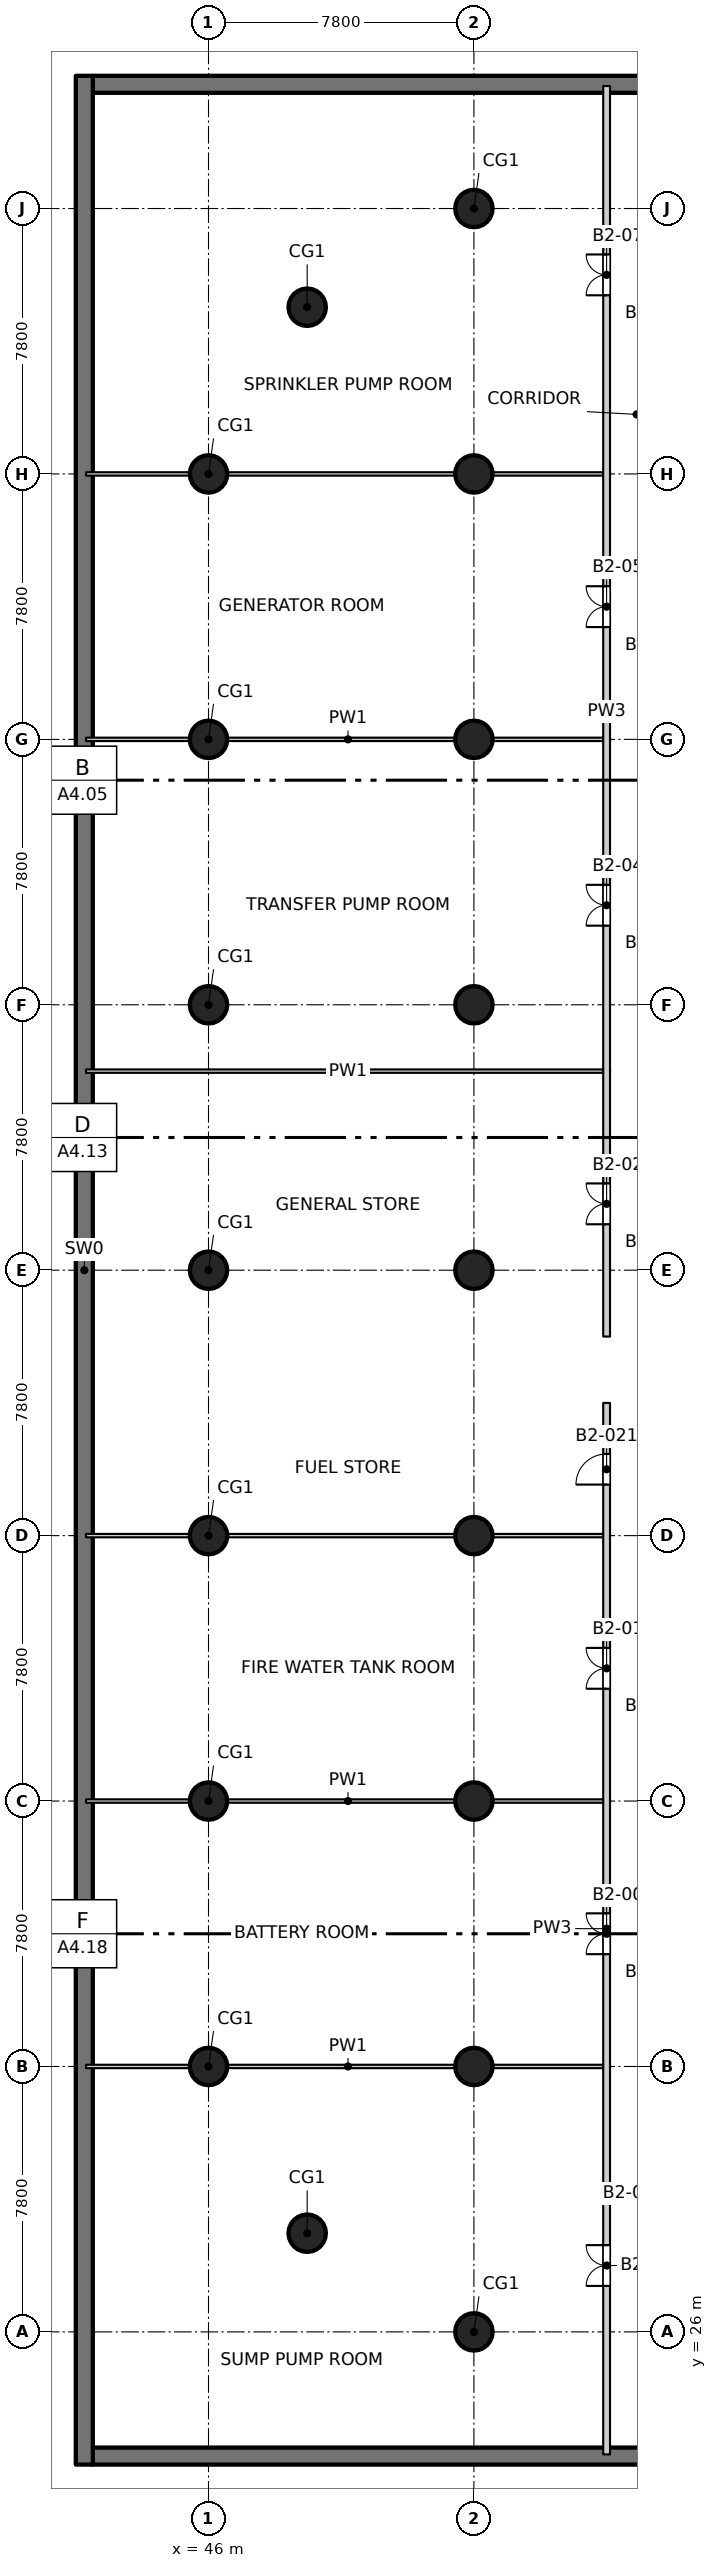
"""IFC4 building model, lengths in metres.
Left out: names, types, materials, properties, quantities, classifications, styles, units other than length and angle.
Written with IfcOpenShell. Run it as: python <this file> out.ifc"""

import sys

from ifc_helpers import new_model, si_unit, direction, frame, frame_2d, origin, origin_2d, place, context, subcontext, project, spatial, rectangle, circle, extrude, element, fill, save


model = new_model("IFC4")
c1 = context("Model", 3, precision=1e-05, world=origin(), true_north=direction((0.0, 1.0)))
c2 = subcontext(c1, "Body", "Model", "MODEL_VIEW")
j1 = project(units=[si_unit("LENGTHUNIT", "METRE"), si_unit("PLANEANGLEUNIT", "RADIAN")], contexts=[c1])
p1 = place(None, origin())
s1 = spatial("IfcSite", under=j1, at=p1, CompositionType="ELEMENT")
p2 = place(p1, origin())
s2 = spatial("IfcBuilding", under=s1, at=p2, CompositionType="ELEMENT")
p3 = place(p2, frame((0.0, 0.0, -9.0)))
s3 = spatial("IfcBuildingStorey", under=s2, at=p3, CompositionType="ELEMENT", Elevation=-9.0)
for number, where, z_axis, x_axis in (
    (1, (42.6, 22.35, -0.5), (0.0, 0.0, 1.0), (1.0, 0.0, 0.0)),
    (2, (42.6, 92.05, -0.5), (0.0, 0.0, 1.0), (1.0, 0.0, 0.0)),
):
    element("IfcWall", number, at=place(p3, frame(where, z_axis=z_axis, x_axis=x_axis)), inside=s3, PredefinedType="SOLIDWALL", context=c2, shape_type="SweptSolid", body=[
        extrude(rectangle(XDim=84.8, YDim=0.5, at=frame_2d((42.4, 0.0))), origin(), (0.0, 0.0, 1.0), 4.65),
    ])
p4 = place(p3, frame((42.35, 22.1, -0.5), z_axis=(0.0, 0.0, 1.0), x_axis=(0.0, 1.0, 0.0)))
e3 = element("IfcWall", 3, at=p4, inside=s3, PredefinedType="SOLIDWALL", context=c2, shape_type="SweptSolid", body=[
    extrude(rectangle(XDim=70.2, YDim=0.5, at=frame_2d((35.1, 0.0))), origin(), (0.0, 0.0, 1.0), 4.65),
])
for number, where, z_axis, x_axis in (
    (4, (48.9, 28.9, -0.5), (0.0, 0.0, 1.0), (1.0, 0.0, 0.0)),
    (5, (46.0, 33.8, -0.5), (0.0, 0.0, 1.0), (1.0, 0.0, 0.0)),
    (6, (46.0, 41.6, -0.5), (0.0, 0.0, 1.0), (1.0, 0.0, 0.0)),
    (7, (46.0, 49.4, -0.5), (0.0, 0.0, 1.0), (1.0, 0.0, 0.0)),
    (8, (46.0, 57.2, -0.5), (0.0, 0.0, 1.0), (1.0, 0.0, 0.0)),
    (9, (46.0, 65.0, -0.5), (0.0, 0.0, 1.0), (1.0, 0.0, 0.0)),
    (10, (46.0, 72.8, -0.5), (0.0, 0.0, 1.0), (1.0, 0.0, 0.0)),
    (11, (46.0, 80.6, -0.5), (0.0, 0.0, 1.0), (1.0, 0.0, 0.0)),
    (12, (48.9, 85.5, -0.5), (0.0, 0.0, 1.0), (1.0, 0.0, 0.0)),
    (13, (53.8, 26.0, -0.5), (0.0, 0.0, 1.0), (1.0, 0.0, 0.0)),
    (14, (53.8, 33.8, -0.5), (0.0, 0.0, 1.0), (1.0, 0.0, 0.0)),
    (15, (53.8, 41.6, -0.5), (0.0, 0.0, 1.0), (1.0, 0.0, 0.0)),
    (16, (53.8, 49.4, -0.5), (0.0, 0.0, 1.0), (1.0, 0.0, 0.0)),
    (17, (53.8, 57.2, -0.5), (0.0, 0.0, 1.0), (1.0, 0.0, 0.0)),
    (18, (53.8, 65.0, -0.5), (0.0, 0.0, 1.0), (1.0, 0.0, 0.0)),
    (19, (53.8, 72.8, -0.5), (0.0, 0.0, 1.0), (1.0, 0.0, 0.0)),
    (20, (53.8, 80.6, -0.5), (0.0, 0.0, 1.0), (1.0, 0.0, 0.0)),
    (21, (53.8, 88.4, -0.5), (0.0, 0.0, 1.0), (1.0, 0.0, 0.0)),
):
    element("IfcColumn", number, at=place(p3, frame(where, z_axis=z_axis, x_axis=x_axis)), inside=s3, PredefinedType="COLUMN", context=c2, shape_type="SweptSolid", body=[
        extrude(circle(Radius=0.55, at=origin_2d()), origin(), (0.0, 0.0, 1.0), 4.65),
    ])
for number, where, z_axis, x_axis in (
    (22, (42.4, 33.8, 0.0), (0.0, 0.0, 1.0), (1.0, 0.0, 0.0)),
    (23, (42.4, 41.6, 0.0), (0.0, 0.0, 1.0), (1.0, 0.0, 0.0)),
    (24, (42.4, 49.4, 0.0), (0.0, 0.0, 1.0), (1.0, 0.0, 0.0)),
    (25, (42.4, 63.05, 0.0), (0.0, 0.0, 1.0), (1.0, 0.0, 0.0)),
    (26, (42.4, 72.8, 0.0), (0.0, 0.0, 1.0), (1.0, 0.0, 0.0)),
    (27, (42.4, 80.6, 0.0), (0.0, 0.0, 1.0), (1.0, 0.0, 0.0)),
):
    element("IfcWall", number, at=place(p3, frame(where, z_axis=z_axis, x_axis=x_axis)), inside=s3, PredefinedType="PARTITIONING", context=c2, shape_type="SweptSolid", body=[
        extrude(rectangle(XDim=15.4, YDim=0.1, at=frame_2d((7.7, 0.0))), origin(), (0.0, 0.0, 1.0), 4.15),
    ])
p5 = place(p3, frame((57.7, 22.4, 0.0), z_axis=(0.0, 0.0, 1.0), x_axis=(0.0, 1.0, 0.0)))
e28 = element("IfcWall", 28, at=p5, inside=s3, PredefinedType="PARTITIONING", context=c2, shape_type="SweptSolid", body=[
    extrude(rectangle(XDim=30.9, YDim=0.2, at=frame_2d((15.45, 0.0))), origin(), (0.0, 0.0, 1.0), 4.15),
])
p6 = place(p5, frame((4.95, 0.0, 0.0)))
e29 = element("IfcOpeningElement", 29, at=p6, cuts=e28, PredefinedType="OPENING", context=c2, shape_type="SweptSolid", body=[
    extrude(rectangle(XDim=1.2, YDim=2.1, at=frame_2d((0.6, 1.05))), frame((0.0, 0.11, 0.0), z_axis=(0.0, -1.0, 0.0), x_axis=(1.0, 0.0, 0.0)), (0.0, 0.0, 1.0), 0.22),
])
p7 = place(p5, frame((14.7, 0.0, 0.0)))
e30 = element("IfcOpeningElement", 30, at=p7, cuts=e28, PredefinedType="OPENING", context=c2, shape_type="SweptSolid", body=[
    extrude(rectangle(XDim=1.2, YDim=2.1, at=frame_2d((0.6, 1.05))), frame((0.0, 0.11, 0.0), z_axis=(0.0, -1.0, 0.0), x_axis=(1.0, 0.0, 0.0)), (0.0, 0.0, 1.0), 0.22),
])
p8 = place(p5, frame((22.5, 0.0, 0.0)))
e31 = element("IfcOpeningElement", 31, at=p8, cuts=e28, PredefinedType="OPENING", context=c2, shape_type="SweptSolid", body=[
    extrude(rectangle(XDim=1.2, YDim=2.1, at=frame_2d((0.6, 1.05))), frame((0.0, 0.11, 0.0), z_axis=(0.0, -1.0, 0.0), x_axis=(1.0, 0.0, 0.0)), (0.0, 0.0, 1.0), 0.22),
])
p9 = place(p5, frame((28.5, 0.0, 0.0)))
e32 = element("IfcOpeningElement", 32, at=p9, cuts=e28, PredefinedType="OPENING", context=c2, shape_type="SweptSolid", body=[
    extrude(rectangle(XDim=0.9, YDim=2.1, at=frame_2d((0.45, 1.05))), frame((0.0, 0.11, 0.0), z_axis=(0.0, -1.0, 0.0), x_axis=(1.0, 0.0, 0.0)), (0.0, 0.0, 1.0), 0.22),
])
p10 = place(p3, frame((57.7, 55.25, 0.0), z_axis=(0.0, 0.0, 1.0), x_axis=(0.0, 1.0, 0.0)))
e33 = element("IfcWall", 33, at=p10, inside=s3, PredefinedType="PARTITIONING", context=c2, shape_type="SweptSolid", body=[
    extrude(rectangle(XDim=36.75, YDim=0.2, at=frame_2d((18.375, 0.0))), origin(), (0.0, 0.0, 1.0), 4.15),
])
p11 = place(p10, frame((3.3, 0.0, 0.0)))
e34 = element("IfcOpeningElement", 34, at=p11, cuts=e33, PredefinedType="OPENING", context=c2, shape_type="SweptSolid", body=[
    extrude(rectangle(XDim=1.2, YDim=2.1, at=frame_2d((0.6, 1.05))), frame((0.0, 0.11, 0.0), z_axis=(0.0, -1.0, 0.0), x_axis=(1.0, 0.0, 0.0)), (0.0, 0.0, 1.0), 0.22),
])
p12 = place(p10, frame((12.075, 0.0, 0.0)))
e35 = element("IfcOpeningElement", 35, at=p12, cuts=e33, PredefinedType="OPENING", context=c2, shape_type="SweptSolid", body=[
    extrude(rectangle(XDim=1.2, YDim=2.1, at=frame_2d((0.6, 1.05))), frame((0.0, 0.11, 0.0), z_axis=(0.0, -1.0, 0.0), x_axis=(1.0, 0.0, 0.0)), (0.0, 0.0, 1.0), 0.22),
])
p13 = place(p10, frame((20.85, 0.0, 0.0)))
e36 = element("IfcOpeningElement", 36, at=p13, cuts=e33, PredefinedType="OPENING", context=c2, shape_type="SweptSolid", body=[
    extrude(rectangle(XDim=1.2, YDim=2.1, at=frame_2d((0.6, 1.05))), frame((0.0, 0.11, 0.0), z_axis=(0.0, -1.0, 0.0), x_axis=(1.0, 0.0, 0.0)), (0.0, 0.0, 1.0), 0.22),
])
p14 = place(p10, frame((30.6, 0.0, 0.0)))
e37 = element("IfcOpeningElement", 37, at=p14, cuts=e33, PredefinedType="OPENING", context=c2, shape_type="SweptSolid", body=[
    extrude(rectangle(XDim=1.2, YDim=2.1, at=frame_2d((0.6, 1.05))), frame((0.0, 0.11, 0.0), z_axis=(0.0, -1.0, 0.0), x_axis=(1.0, 0.0, 0.0)), (0.0, 0.0, 1.0), 0.22),
])
p15 = place(p6, origin())
e38 = element("IfcDoor", 38, at=p15, inside=s3, OperationType="DOUBLE_DOOR_SINGLE_SWING", PredefinedType="DOOR", context=c2, shape_type="SweptSolid", body=[
    extrude(rectangle(XDim=1.2, YDim=2.1, at=frame_2d((0.6, 1.05))), frame((0.0, 0.025, 0.0), z_axis=(0.0, -1.0, 0.0), x_axis=(1.0, 0.0, 0.0)), (0.0, 0.0, 1.0), 0.05),
])
fill(e29, e38)
p16 = place(p7, origin())
e39 = element("IfcDoor", 39, at=p16, inside=s3, OperationType="DOUBLE_DOOR_SINGLE_SWING", PredefinedType="DOOR", context=c2, shape_type="SweptSolid", body=[
    extrude(rectangle(XDim=1.2, YDim=2.1, at=frame_2d((0.6, 1.05))), frame((0.0, 0.025, 0.0), z_axis=(0.0, -1.0, 0.0), x_axis=(1.0, 0.0, 0.0)), (0.0, 0.0, 1.0), 0.05),
])
fill(e30, e39)
p17 = place(p8, origin())
e40 = element("IfcDoor", 40, at=p17, inside=s3, OperationType="DOUBLE_DOOR_SINGLE_SWING", PredefinedType="DOOR", context=c2, shape_type="SweptSolid", body=[
    extrude(rectangle(XDim=1.2, YDim=2.1, at=frame_2d((0.6, 1.05))), frame((0.0, 0.025, 0.0), z_axis=(0.0, -1.0, 0.0), x_axis=(1.0, 0.0, 0.0)), (0.0, 0.0, 1.0), 0.05),
])
fill(e31, e40)
p18 = place(p9, origin())
e41 = element("IfcDoor", 41, at=p18, inside=s3, OperationType="SINGLE_SWING_LEFT", PredefinedType="DOOR", context=c2, shape_type="SweptSolid", body=[
    extrude(rectangle(XDim=0.9, YDim=2.1, at=frame_2d((0.45, 1.05))), frame((0.0, 0.025, 0.0), z_axis=(0.0, -1.0, 0.0), x_axis=(1.0, 0.0, 0.0)), (0.0, 0.0, 1.0), 0.05),
])
fill(e32, e41)
p19 = place(p11, origin())
e42 = element("IfcDoor", 42, at=p19, inside=s3, OperationType="DOUBLE_DOOR_SINGLE_SWING", PredefinedType="DOOR", context=c2, shape_type="SweptSolid", body=[
    extrude(rectangle(XDim=1.2, YDim=2.1, at=frame_2d((0.6, 1.05))), frame((0.0, 0.025, 0.0), z_axis=(0.0, -1.0, 0.0), x_axis=(1.0, 0.0, 0.0)), (0.0, 0.0, 1.0), 0.05),
])
fill(e34, e42)
p20 = place(p12, origin())
e43 = element("IfcDoor", 43, at=p20, inside=s3, OperationType="DOUBLE_DOOR_SINGLE_SWING", PredefinedType="DOOR", context=c2, shape_type="SweptSolid", body=[
    extrude(rectangle(XDim=1.2, YDim=2.1, at=frame_2d((0.6, 1.05))), frame((0.0, 0.025, 0.0), z_axis=(0.0, -1.0, 0.0), x_axis=(1.0, 0.0, 0.0)), (0.0, 0.0, 1.0), 0.05),
])
fill(e35, e43)
p21 = place(p13, origin())
e44 = element("IfcDoor", 44, at=p21, inside=s3, OperationType="DOUBLE_DOOR_SINGLE_SWING", PredefinedType="DOOR", context=c2, shape_type="SweptSolid", body=[
    extrude(rectangle(XDim=1.2, YDim=2.1, at=frame_2d((0.6, 1.05))), frame((0.0, 0.025, 0.0), z_axis=(0.0, -1.0, 0.0), x_axis=(1.0, 0.0, 0.0)), (0.0, 0.0, 1.0), 0.05),
])
fill(e36, e44)
p22 = place(p14, origin())
e45 = element("IfcDoor", 45, at=p22, inside=s3, OperationType="DOUBLE_DOOR_SINGLE_SWING", PredefinedType="DOOR", context=c2, shape_type="SweptSolid", body=[
    extrude(rectangle(XDim=1.2, YDim=2.1, at=frame_2d((0.6, 1.05))), frame((0.0, 0.025, 0.0), z_axis=(0.0, -1.0, 0.0), x_axis=(1.0, 0.0, 0.0)), (0.0, 0.0, 1.0), 0.05),
])
fill(e37, e45)
save(model, sys.argv[1])
